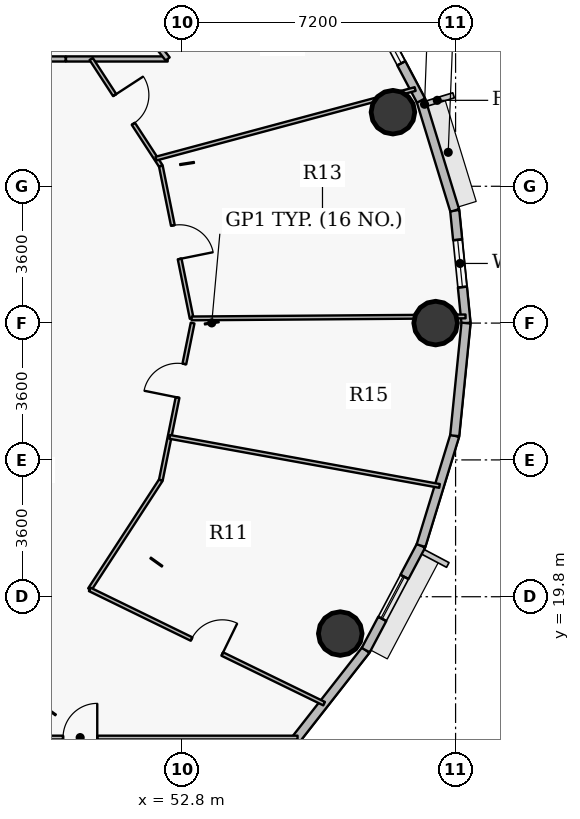
"""IFC4 building model, lengths in metres.
Left out: names, types, materials, properties, quantities, classifications, styles, units other than length and angle.
Written with IfcOpenShell. Run it as: python <this file> out.ifc"""

import sys

from ifc_helpers import new_model, si_unit, direction, frame, frame_2d, origin, origin_2d, place, context, subcontext, project, spatial, rectangle, hollow_circle, extrude, source, transform, mapped, element, fill, save


model = new_model("IFC4")
c1 = context("Model", 3, precision=1e-05, world=origin(), true_north=direction((0.0, 1.0)))
c2 = subcontext(c1, "Body", "Model", "MODEL_VIEW")
j1 = project(units=[si_unit("LENGTHUNIT", "METRE"), si_unit("PLANEANGLEUNIT", "RADIAN")], contexts=[c1])
p1 = place(None, origin())
s1 = spatial("IfcSite", under=j1, at=p1, CompositionType="ELEMENT")
p2 = place(p1, origin())
s2 = spatial("IfcBuilding", under=s1, at=p2, CompositionType="ELEMENT")
p3 = place(p2, frame((0.0, 0.0, 229.05)))
s3 = spatial("IfcBuildingStorey", under=s2, at=p3, CompositionType="ELEMENT", Elevation=229.05)
for number, where, z_axis, x_axis in (
    (1, (59.475, 27.0, 0.0), (0.0, 0.0, 1.0), (1.0, 0.0, 0.0)),
    (2, (58.351, 32.549, 0.0), (0.0, 0.0, 1.0), (1.0, 0.0, 0.0)),
    (3, (56.965, 18.831, 0.0), (0.0, 0.0, 1.0), (1.0, 0.0, 0.0)),
):
    element("IfcColumn", number, at=place(p3, frame(where, z_axis=z_axis, x_axis=x_axis)), inside=s3, PredefinedType="COLUMN", context=c2, shape_type="SweptSolid", body=[
        extrude(hollow_circle(Radius=0.575, WallThickness=0.036, at=origin_2d()), origin(), (0.0, 0.0, 1.0), 3.75),
    ])
p4 = place(p3, frame((59.977, 29.964, 0.0), z_axis=(0.0, 0.0, 1.0), x_axis=(0.099990595253, -0.994988382274, 0.0)))
e4 = element("IfcWall", 4, at=p4, inside=s3, PredefinedType="SOLIDWALL", context=c2, shape_type="SweptSolid", body=[
    extrude(rectangle(XDim=2.979, YDim=0.24, at=frame_2d((1.489, 0.0))), origin(), (0.0, 0.0, 1.0), 3.5),
])
p5 = place(p4, frame((0.777, 0.0, 0.9)))
e5 = element("IfcOpeningElement", 5, at=p5, cuts=e4, PredefinedType="OPENING", context=c2, shape_type="SweptSolid", body=[
    extrude(rectangle(XDim=1.25, YDim=1.65, at=origin_2d()), frame((0.625, 0.13, 0.825), z_axis=(0.0, -1.0, 0.0), x_axis=(1.0, 0.0, 0.0)), (0.0, 0.0, 1.0), 0.26),
])
p6 = place(p3, frame((59.09, 32.856, 0.0), z_axis=(0.0, 0.0, 1.0), x_axis=(0.293132907334, -0.95607170162, 0.0)))
e6 = element("IfcWall", 6, at=p6, inside=s3, PredefinedType="SOLIDWALL", context=c2, shape_type="SweptSolid", body=[
    extrude(rectangle(XDim=3.025, YDim=0.24, at=frame_2d((1.512, 0.0))), origin(), (0.0, 0.0, 1.0), 3.5),
])
p7 = place(p3, frame((57.636, 35.605, 0.0), z_axis=(0.0, 0.0, 1.0), x_axis=(0.46766049993, -0.883908172157, 0.0)))
e7 = element("IfcWall", 7, at=p7, inside=s3, PredefinedType="SOLIDWALL", context=c2, shape_type="SweptSolid", body=[
    extrude(rectangle(XDim=3.11, YDim=0.24, at=frame_2d((1.555, 0.0))), origin(), (0.0, 0.0, 1.0), 3.5),
])
p8 = place(p7, frame((0.751, 0.0, 0.9)))
e8 = element("IfcOpeningElement", 8, at=p8, cuts=e7, PredefinedType="OPENING", context=c2, shape_type="SweptSolid", body=[
    extrude(rectangle(XDim=1.25, YDim=1.65, at=origin_2d()), frame((0.625, 0.13, 0.825), z_axis=(0.0, -1.0, 0.0), x_axis=(1.0, 0.0, 0.0)), (0.0, 0.0, 1.0), 0.26),
])
p9 = place(p3, frame((57.636, 18.395, 0.0), z_axis=(0.0, 0.0, 1.0), x_axis=(-0.616312344705, -0.787501805562, 0.0)))
e9 = element("IfcWall", 9, at=p9, inside=s3, PredefinedType="SOLIDWALL", context=c2, shape_type="SweptSolid", body=[
    extrude(rectangle(XDim=3.225, YDim=0.24, at=frame_2d((1.612, 0.0))), origin(), (0.0, 0.0, 1.0), 3.5),
])
p10 = place(p3, frame((59.09, 21.144, 0.0), z_axis=(0.0, 0.0, 1.0), x_axis=(-0.46766049993, -0.883908172157, 0.0)))
e10 = element("IfcWall", 10, at=p10, inside=s3, PredefinedType="SOLIDWALL", context=c2, shape_type="SweptSolid", body=[
    extrude(rectangle(XDim=3.11, YDim=0.24, at=frame_2d((1.555, 0.0))), origin(), (0.0, 0.0, 1.0), 3.5),
])
p11 = place(p10, frame((0.93, 0.0, 0.9)))
e11 = element("IfcOpeningElement", 11, at=p11, cuts=e10, PredefinedType="OPENING", context=c2, shape_type="SweptSolid", body=[
    extrude(rectangle(XDim=1.25, YDim=1.65, at=origin_2d()), frame((0.625, 0.13, 0.825), z_axis=(0.0, -1.0, 0.0), x_axis=(1.0, 0.0, 0.0)), (0.0, 0.0, 1.0), 0.26),
])
p12 = place(p3, frame((59.977, 24.036, 0.0), z_axis=(0.0, 0.0, 1.0), x_axis=(-0.293132907334, -0.95607170162, 0.0)))
e12 = element("IfcWall", 12, at=p12, inside=s3, PredefinedType="SOLIDWALL", context=c2, shape_type="SweptSolid", body=[
    extrude(rectangle(XDim=3.025, YDim=0.24, at=frame_2d((1.512, 0.0))), origin(), (0.0, 0.0, 1.0), 3.5),
])
p13 = place(p3, frame((60.275, 27.0, 0.0), z_axis=(0.0, 0.0, 1.0), x_axis=(-0.099990595253, -0.994988382274, 0.0)))
e13 = element("IfcWall", 13, at=p13, inside=s3, PredefinedType="SOLIDWALL", context=c2, shape_type="SweptSolid", body=[
    extrude(rectangle(XDim=2.979, YDim=0.24, at=frame_2d((1.489, 0.0))), origin(), (0.0, 0.0, 1.0), 3.5),
])
p14 = place(p3, frame((44.401, 16.094, 0.0), z_axis=(0.0, 0.0, 1.0), x_axis=(1.0, 0.0, 0.0)))
e14 = element("IfcWall", 14, at=p14, inside=s3, PredefinedType="PARTITIONING", context=c2, shape_type="SweptSolid", body=[
    extrude(rectangle(XDim=11.441, YDim=0.1, at=frame_2d((5.72, 0.0))), origin(), (0.0, 0.0, 1.0), 2.935),
])
p15 = place(p14, frame((5.271, 0.0, 0.0)))
e15 = element("IfcOpeningElement", 15, at=p15, cuts=e14, PredefinedType="OPENING", context=c2, shape_type="SweptSolid", body=[
    extrude(rectangle(XDim=0.9, YDim=2.1, at=origin_2d()), frame((0.45, 0.06, 1.05), z_axis=(0.0, -1.0, 0.0), x_axis=(1.0, 0.0, 0.0)), (0.0, 0.0, 1.0), 0.12),
])
p16 = place(p3, frame((49.748, 33.95, 0.0), z_axis=(0.0, 0.0, 1.0), x_axis=(1.0, 0.0, 0.0)))
e16 = element("IfcWall", 16, at=p16, inside=s3, PredefinedType="PARTITIONING", context=c2, shape_type="SweptSolid", body=[
    extrude(rectangle(XDim=2.676, YDim=0.135, at=frame_2d((1.338, 0.0))), origin(), (0.0, 0.0, 1.0), 3.5),
])
p17 = place(p3, frame((50.374, 19.993, 0.0), z_axis=(0.0, 0.0, 1.0), x_axis=(0.545433660686, 0.838153996465, 0.0)))
e17 = element("IfcWall", 17, at=p17, inside=s3, PredefinedType="PARTITIONING", context=c2, shape_type="SweptSolid", body=[
    extrude(rectangle(XDim=3.43, YDim=0.1, at=frame_2d((1.715, 0.0))), origin(), (0.0, 0.0, 1.0), 2.935),
])
p18 = place(p3, frame((50.374, 19.993, 0.0), z_axis=(0.0, 0.0, 1.0), x_axis=(0.898866241562, -0.438223093618, 0.0)))
e18 = element("IfcWall", 18, at=p18, inside=s3, PredefinedType="PARTITIONING", context=c2, shape_type="SweptSolid", body=[
    extrude(rectangle(XDim=6.86, YDim=0.1, at=frame_2d((3.43, 0.0))), origin(), (0.0, 0.0, 1.0), 2.985),
])
p19 = place(p18, frame((2.98, 0.0, 0.0)))
e19 = element("IfcOpeningElement", 19, at=p19, cuts=e18, PredefinedType="OPENING", context=c2, shape_type="SweptSolid", body=[
    extrude(rectangle(XDim=0.9, YDim=2.1, at=origin_2d()), frame((0.45, 0.06, 1.05), z_axis=(0.0, -1.0, 0.0), x_axis=(1.0, 0.0, 0.0)), (0.0, 0.0, 1.0), 0.12),
])
p20 = place(p3, frame((50.411, 33.95, 0.0), z_axis=(0.0, 0.0, 1.0), x_axis=(0.545427530909, -0.838157985422, 0.0)))
e20 = element("IfcWall", 20, at=p20, inside=s3, PredefinedType="PARTITIONING", context=c2, shape_type="SweptSolid", body=[
    extrude(rectangle(XDim=3.36, YDim=0.1, at=frame_2d((1.68, 0.0))), origin(), (0.0, 0.0, 1.0), 2.935),
])
p21 = place(p20, frame((1.135, 0.0, 0.0)))
e21 = element("IfcOpeningElement", 21, at=p21, cuts=e20, PredefinedType="OPENING", context=c2, shape_type="SweptSolid", body=[
    extrude(rectangle(XDim=0.9, YDim=2.1, at=origin_2d()), frame((0.45, 0.06, 1.05), z_axis=(0.0, -1.0, 0.0), x_axis=(1.0, 0.0, 0.0)), (0.0, 0.0, 1.0), 0.12),
])
p22 = place(p3, frame((51.874, 34.653, 0.0), z_axis=(0.0, 0.0, 1.0), x_axis=(0.61628613448, -0.787522317429, 0.0)))
e22 = element("IfcWall", 22, at=p22, inside=s3, PredefinedType="PARTITIONING", context=c2, shape_type="SweptSolid", body=[
    extrude(rectangle(XDim=0.893, YDim=0.135, at=frame_2d((0.446, 0.0))), origin(), (0.0, 0.0, 1.0), 3.5),
])
p23 = place(p3, frame((52.117, 31.328, 0.0), z_axis=(0.0, 0.0, 1.0), x_axis=(0.965792157348, 0.259317390095, 0.0)))
e23 = element("IfcWall", 23, at=p23, inside=s3, PredefinedType="PARTITIONING", context=c2, shape_type="SweptSolid", body=[
    extrude(rectangle(XDim=7.06, YDim=0.1, at=frame_2d((3.53, 0.0))), origin(), (0.0, 0.0, 1.0), 2.985),
])
p24 = place(p3, frame((52.244, 22.867, 0.0), z_axis=(0.0, 0.0, 1.0), x_axis=(0.198264809747, 0.980148491411, 0.0)))
e24 = element("IfcWall", 24, at=p24, inside=s3, PredefinedType="PARTITIONING", context=c2, shape_type="SweptSolid", body=[
    extrude(rectangle(XDim=4.216, YDim=0.1, at=frame_2d((2.108, 0.0))), origin(), (0.0, 0.0, 1.0), 2.935),
])
p25 = place(p24, frame((2.219, 0.0, 0.0)))
e25 = element("IfcOpeningElement", 25, at=p25, cuts=e24, PredefinedType="OPENING", context=c2, shape_type="SweptSolid", body=[
    extrude(rectangle(XDim=0.9, YDim=2.1, at=origin_2d()), frame((0.45, 0.06, 1.05), z_axis=(0.0, -1.0, 0.0), x_axis=(1.0, 0.0, 0.0)), (0.0, 0.0, 1.0), 0.12),
])
p26 = place(p3, frame((52.244, 31.133, 0.0), z_axis=(0.0, 0.0, 1.0), x_axis=(0.198216162216, -0.980158330596, 0.0)))
e26 = element("IfcWall", 26, at=p26, inside=s3, PredefinedType="PARTITIONING", context=c2, shape_type="SweptSolid", body=[
    extrude(rectangle(XDim=4.09, YDim=0.1, at=frame_2d((2.045, 0.0))), origin(), (0.0, 0.0, 1.0), 2.935),
])
p27 = place(p26, frame((1.595, 0.0, 0.0)))
e27 = element("IfcOpeningElement", 27, at=p27, cuts=e26, PredefinedType="OPENING", context=c2, shape_type="SweptSolid", body=[
    extrude(rectangle(XDim=0.9, YDim=2.1, at=origin_2d()), frame((0.45, 0.06, 1.05), z_axis=(0.0, -1.0, 0.0), x_axis=(1.0, 0.0, 0.0)), (0.0, 0.0, 1.0), 0.12),
])
p28 = place(p3, frame((52.474, 24.006, 0.0), z_axis=(0.0, 0.0, 1.0), x_axis=(0.98388667926, -0.178793183242, 0.0)))
e28 = element("IfcWall", 28, at=p28, inside=s3, PredefinedType="PARTITIONING", context=c2, shape_type="SweptSolid", body=[
    extrude(rectangle(XDim=7.219, YDim=0.1, at=frame_2d((3.61, 0.0))), origin(), (0.0, 0.0, 1.0), 2.985),
])
p29 = place(p3, frame((53.055, 27.123, 0.0), z_axis=(0.0, 0.0, 1.0), x_axis=(0.999973728257, 0.007248640941, 0.0)))
e29 = element("IfcWall", 29, at=p29, inside=s3, PredefinedType="PARTITIONING", context=c2, shape_type="SweptSolid", body=[
    extrude(rectangle(XDim=7.208, YDim=0.1, at=frame_2d((3.604, 0.0))), origin(), (0.0, 0.0, 1.0), 2.935),
])
p30 = place(p3, frame((49.738, 33.95, 0.0), z_axis=(0.0, 0.0, 1.0), x_axis=(-1.0, 0.0, 0.0)))
e30 = element("IfcWall", 30, at=p30, inside=s3, PredefinedType="PARTITIONING", context=c2, shape_type="SweptSolid", body=[
    extrude(rectangle(XDim=3.938, YDim=0.135, at=frame_2d((1.969, 0.0))), origin(), (0.0, 0.0, 1.0), 3.5),
])
m1 = source(origin(), c2, "Body", "SweptSolid", [
    extrude(rectangle(XDim=1.25, YDim=1.65, at=origin_2d()), frame((0.625, 0.03, 0.825), z_axis=(0.0, -1.0, 0.0), x_axis=(1.0, 0.0, 0.0)), (0.0, 0.0, 1.0), 0.06),
])
p31 = place(p5, origin())
e31 = element("IfcWindow", 31, at=p31, inside=s3, PartitioningType="SINGLE_PANEL", PredefinedType="WINDOW", context=c2, shape_type="MappedRepresentation", body=[
    mapped(m1, transform((0.0, 0.0, 0.0), x_axis=(1.0, 0.0, 0.0), y_axis=(0.0, 1.0, 0.0), z_axis=(0.0, 0.0, 1.0), scale=1.0)),
])
fill(e5, e31)
p32 = place(p8, origin())
e32 = element("IfcWindow", 32, at=p32, inside=s3, PartitioningType="SINGLE_PANEL", PredefinedType="WINDOW", context=c2, shape_type="MappedRepresentation", body=[
    mapped(m1, transform((0.0, 0.0, 0.0), x_axis=(1.0, 0.0, 0.0), y_axis=(0.0, 1.0, 0.0), z_axis=(0.0, 0.0, 1.0), scale=1.0)),
])
fill(e8, e32)
p33 = place(p11, origin())
e33 = element("IfcWindow", 33, at=p33, inside=s3, PartitioningType="SINGLE_PANEL", PredefinedType="WINDOW", context=c2, shape_type="MappedRepresentation", body=[
    mapped(m1, transform((0.0, 0.0, 0.0), x_axis=(1.0, 0.0, 0.0), y_axis=(0.0, 1.0, 0.0), z_axis=(0.0, 0.0, 1.0), scale=1.0)),
])
fill(e11, e33)
m2 = source(origin(), c2, "Body", "SweptSolid", [
    extrude(rectangle(XDim=0.9, YDim=2.1, at=origin_2d()), frame((0.45, 0.025, 1.05), z_axis=(0.0, -1.0, 0.0), x_axis=(1.0, 0.0, 0.0)), (0.0, 0.0, 1.0), 0.05),
])
p34 = place(p19, origin())
e34 = element("IfcDoor", 34, at=p34, inside=s3, OperationType="SINGLE_SWING_RIGHT", PredefinedType="DOOR", context=c2, shape_type="MappedRepresentation", body=[
    mapped(m2, transform((0.0, 0.0, 0.0), x_axis=(1.0, 0.0, 0.0), y_axis=(0.0, 1.0, 0.0), z_axis=(0.0, 0.0, 1.0), scale=1.0)),
])
fill(e19, e34)
p35 = place(p25, origin())
e35 = element("IfcDoor", 35, at=p35, inside=s3, OperationType="SINGLE_SWING_LEFT", PredefinedType="DOOR", context=c2, shape_type="MappedRepresentation", body=[
    mapped(m2, transform((0.0, 0.0, 0.0), x_axis=(1.0, 0.0, 0.0), y_axis=(0.0, 1.0, 0.0), z_axis=(0.0, 0.0, 1.0), scale=1.0)),
])
fill(e25, e35)
p36 = place(p27, origin())
e36 = element("IfcDoor", 36, at=p36, inside=s3, OperationType="SINGLE_SWING_RIGHT", PredefinedType="DOOR", context=c2, shape_type="MappedRepresentation", body=[
    mapped(m2, transform((0.0, 0.0, 0.0), x_axis=(1.0, 0.0, 0.0), y_axis=(0.0, 1.0, 0.0), z_axis=(0.0, 0.0, 1.0), scale=1.0)),
])
fill(e27, e36)
p37 = place(p21, origin())
e37 = element("IfcDoor", 37, at=p37, inside=s3, OperationType="SINGLE_SWING_LEFT", PredefinedType="DOOR", context=c2, shape_type="MappedRepresentation", body=[
    mapped(m2, transform((0.0, 0.0, 0.0), x_axis=(1.0, 0.0, 0.0), y_axis=(0.0, 1.0, 0.0), z_axis=(0.0, 0.0, 1.0), scale=1.0)),
])
fill(e21, e37)
p38 = place(p15, origin())
e38 = element("IfcDoor", 38, at=p38, inside=s3, OperationType="SINGLE_SWING_RIGHT", PredefinedType="DOOR", context=c2, shape_type="MappedRepresentation", body=[
    mapped(m2, transform((0.0, 0.0, 0.0), x_axis=(1.0, 0.0, 0.0), y_axis=(0.0, 1.0, 0.0), z_axis=(0.0, 0.0, 1.0), scale=1.0)),
])
fill(e15, e38)
save(model, sys.argv[1])
